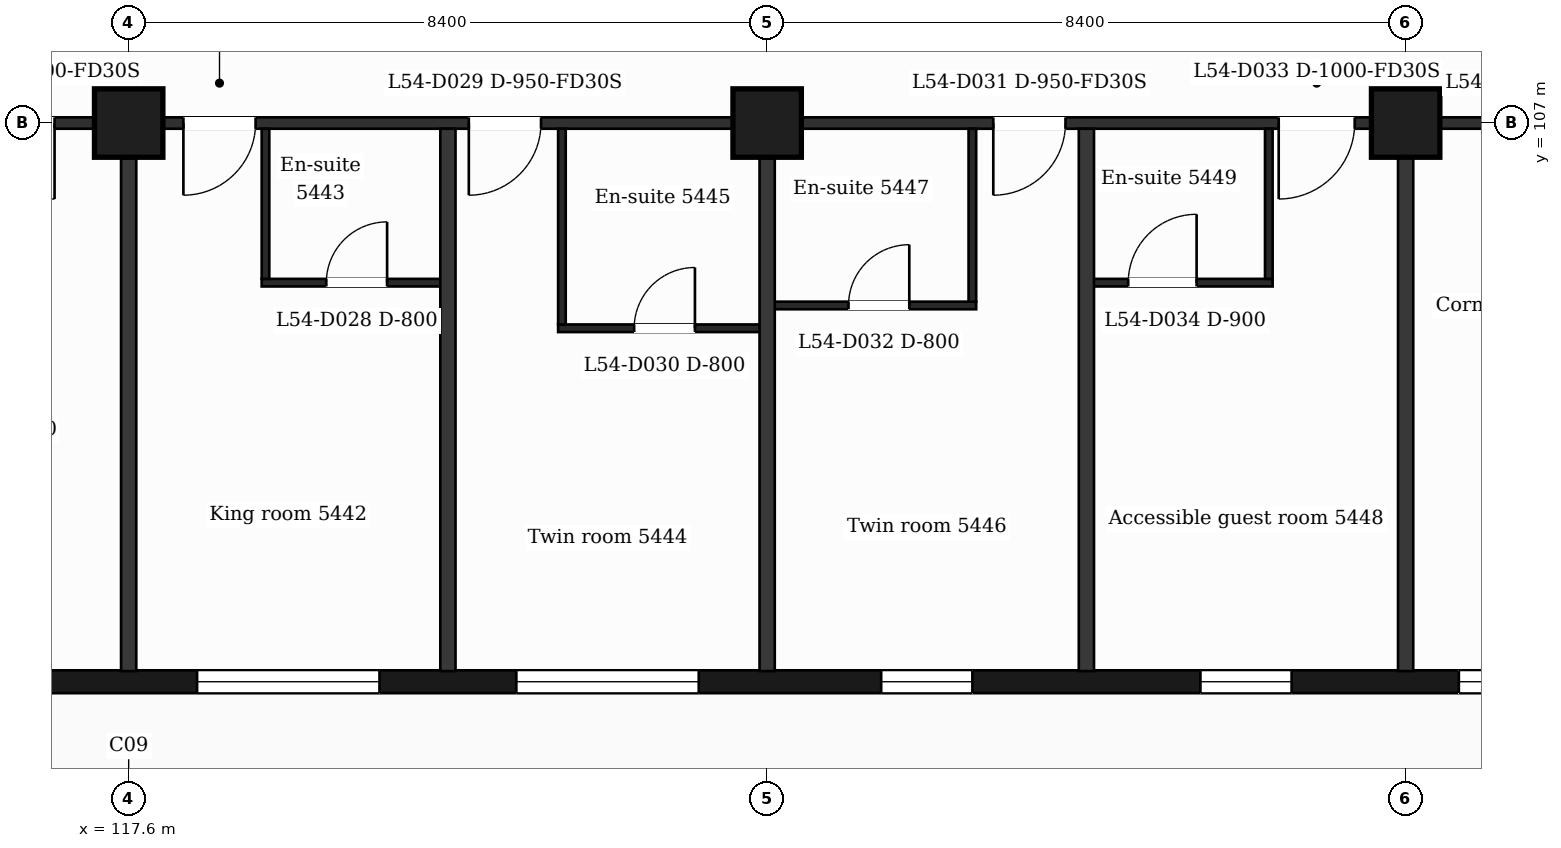
"""IFC4 building model, lengths in metres.
Left out: names, types, materials, properties, quantities, classifications, styles, units other than length and angle.
Written with IfcOpenShell. Run it as: python <this file> out.ifc"""

import sys

from ifc_helpers import new_model, si_unit, direction, frame, frame_2d, origin, origin_2d, place, context, subcontext, project, spatial, rectangle, extrude, element, fill, save


model = new_model("IFC4")
c1 = context("Model", 3, precision=1e-05, world=origin(), true_north=direction((0.0, 1.0)))
c2 = subcontext(c1, "Body", "Model", "MODEL_VIEW")
j1 = project(units=[si_unit("LENGTHUNIT", "METRE"), si_unit("PLANEANGLEUNIT", "RADIAN")], contexts=[c1])
p1 = place(None, origin())
s1 = spatial("IfcSite", under=j1, at=p1, CompositionType="ELEMENT")
p2 = place(p1, origin())
s2 = spatial("IfcBuilding", under=s1, at=p2, CompositionType="ELEMENT")
p3 = place(p2, frame((0.0, 0.0, 224.4)))
s3 = spatial("IfcBuildingStorey", under=s2, at=p3, CompositionType="ELEMENT", Elevation=224.4)
for number, where, z_axis, x_axis in (
    (1, (117.6, 107.0, 0.0), (0.0, 0.0, 1.0), (1.0, 0.0, 0.0)),
    (2, (126.0, 107.0, 0.0), (0.0, 0.0, 1.0), (1.0, 0.0, 0.0)),
    (3, (134.4, 107.0, 0.0), (0.0, 0.0, 1.0), (1.0, 0.0, 0.0)),
):
    element("IfcColumn", number, at=place(p3, frame(where, z_axis=z_axis, x_axis=x_axis)), inside=s3, PredefinedType="COLUMN", context=c2, shape_type="SweptSolid", body=[
        extrude(rectangle(XDim=0.9, YDim=0.9, at=origin_2d()), origin(), (0.0, 0.0, 1.0), 3.7),
    ])
p4 = place(p3, frame((89.85, 99.65, 0.0), z_axis=(0.0, 0.0, 1.0), x_axis=(1.0, 0.0, 0.0)))
e4 = element("IfcWall", 4, at=p4, inside=s3, PredefinedType="SOLIDWALL", context=c2, shape_type="SweptSolid", body=[
    extrude(rectangle(XDim=47.25, YDim=0.3, at=frame_2d((23.625, 0.0))), origin(), (0.0, 0.0, 1.0), 3.38),
])
p5 = place(p4, frame((0.725, 0.0, 0.9)))
e5 = element("IfcOpeningElement", 5, at=p5, cuts=e4, PredefinedType="OPENING", context=c2, shape_type="SweptSolid", body=[
    extrude(rectangle(XDim=1.2, YDim=2.1, at=frame_2d((0.6, 1.05))), frame((0.0, 0.16, 0.0), z_axis=(0.0, -1.0, 0.0), x_axis=(1.0, 0.0, 0.0)), (0.0, 0.0, 1.0), 0.32),
])
p6 = place(p4, frame((3.45, 0.0, 0.9)))
e6 = element("IfcOpeningElement", 6, at=p6, cuts=e4, PredefinedType="OPENING", context=c2, shape_type="SweptSolid", body=[
    extrude(rectangle(XDim=2.4, YDim=2.1, at=frame_2d((1.2, 1.05))), frame((0.0, 0.16, 0.0), z_axis=(0.0, -1.0, 0.0), x_axis=(1.0, 0.0, 0.0)), (0.0, 0.0, 1.0), 0.32),
])
p7 = place(p4, frame((8.25, 0.0, 0.9)))
e7 = element("IfcOpeningElement", 7, at=p7, cuts=e4, PredefinedType="OPENING", context=c2, shape_type="SweptSolid", body=[
    extrude(rectangle(XDim=1.2, YDim=2.1, at=frame_2d((0.6, 1.05))), frame((0.0, 0.16, 0.0), z_axis=(0.0, -1.0, 0.0), x_axis=(1.0, 0.0, 0.0)), (0.0, 0.0, 1.0), 0.32),
])
p8 = place(p4, frame((12.45, 0.0, 0.9)))
e8 = element("IfcOpeningElement", 8, at=p8, cuts=e4, PredefinedType="OPENING", context=c2, shape_type="SweptSolid", body=[
    extrude(rectangle(XDim=1.2, YDim=2.1, at=frame_2d((0.6, 1.05))), frame((0.0, 0.16, 0.0), z_axis=(0.0, -1.0, 0.0), x_axis=(1.0, 0.0, 0.0)), (0.0, 0.0, 1.0), 0.32),
])
p9 = place(p4, frame((16.05, 0.0, 0.9)))
e9 = element("IfcOpeningElement", 9, at=p9, cuts=e4, PredefinedType="OPENING", context=c2, shape_type="SweptSolid", body=[
    extrude(rectangle(XDim=2.4, YDim=2.1, at=frame_2d((1.2, 1.05))), frame((0.0, 0.16, 0.0), z_axis=(0.0, -1.0, 0.0), x_axis=(1.0, 0.0, 0.0)), (0.0, 0.0, 1.0), 0.32),
])
p10 = place(p4, frame((20.25, 0.0, 0.9)))
e10 = element("IfcOpeningElement", 10, at=p10, cuts=e4, PredefinedType="OPENING", context=c2, shape_type="SweptSolid", body=[
    extrude(rectangle(XDim=2.4, YDim=2.1, at=frame_2d((1.2, 1.05))), frame((0.0, 0.16, 0.0), z_axis=(0.0, -1.0, 0.0), x_axis=(1.0, 0.0, 0.0)), (0.0, 0.0, 1.0), 0.32),
])
p11 = place(p4, frame((25.05, 0.0, 0.0)))
e11 = element("IfcOpeningElement", 11, at=p11, cuts=e4, PredefinedType="OPENING", context=c2, shape_type="SweptSolid", body=[
    extrude(rectangle(XDim=1.2, YDim=2.4, at=frame_2d((0.6, 1.2))), frame((0.0, 0.16, 0.0), z_axis=(0.0, -1.0, 0.0), x_axis=(1.0, 0.0, 0.0)), (0.0, 0.0, 1.0), 0.32),
])
p12 = place(p4, frame((28.65, 0.0, 0.9)))
e12 = element("IfcOpeningElement", 12, at=p12, cuts=e4, PredefinedType="OPENING", context=c2, shape_type="SweptSolid", body=[
    extrude(rectangle(XDim=2.4, YDim=2.1, at=frame_2d((1.2, 1.05))), frame((0.0, 0.16, 0.0), z_axis=(0.0, -1.0, 0.0), x_axis=(1.0, 0.0, 0.0)), (0.0, 0.0, 1.0), 0.32),
])
p13 = place(p4, frame((32.85, 0.0, 0.9)))
e13 = element("IfcOpeningElement", 13, at=p13, cuts=e4, PredefinedType="OPENING", context=c2, shape_type="SweptSolid", body=[
    extrude(rectangle(XDim=2.4, YDim=2.1, at=frame_2d((1.2, 1.05))), frame((0.0, 0.16, 0.0), z_axis=(0.0, -1.0, 0.0), x_axis=(1.0, 0.0, 0.0)), (0.0, 0.0, 1.0), 0.32),
])
p14 = place(p4, frame((37.65, 0.0, 0.9)))
e14 = element("IfcOpeningElement", 14, at=p14, cuts=e4, PredefinedType="OPENING", context=c2, shape_type="SweptSolid", body=[
    extrude(rectangle(XDim=1.2, YDim=2.1, at=frame_2d((0.6, 1.05))), frame((0.0, 0.16, 0.0), z_axis=(0.0, -1.0, 0.0), x_axis=(1.0, 0.0, 0.0)), (0.0, 0.0, 1.0), 0.32),
])
p15 = place(p4, frame((41.85, 0.0, 0.9)))
e15 = element("IfcOpeningElement", 15, at=p15, cuts=e4, PredefinedType="OPENING", context=c2, shape_type="SweptSolid", body=[
    extrude(rectangle(XDim=1.2, YDim=2.1, at=frame_2d((0.6, 1.05))), frame((0.0, 0.16, 0.0), z_axis=(0.0, -1.0, 0.0), x_axis=(1.0, 0.0, 0.0)), (0.0, 0.0, 1.0), 0.32),
])
p16 = place(p4, frame((45.25, 0.0, 0.9)))
e16 = element("IfcOpeningElement", 16, at=p16, cuts=e4, PredefinedType="OPENING", context=c2, shape_type="SweptSolid", body=[
    extrude(rectangle(XDim=1.2, YDim=2.1, at=frame_2d((0.6, 1.05))), frame((0.0, 0.16, 0.0), z_axis=(0.0, -1.0, 0.0), x_axis=(1.0, 0.0, 0.0)), (0.0, 0.0, 1.0), 0.32),
])
p17 = place(p3, frame((123.25, 104.3, 0.0), z_axis=(0.0, 0.0, 1.0), x_axis=(1.0, 0.0, 0.0)))
e17 = element("IfcWall", 17, at=p17, inside=s3, PredefinedType="PARTITIONING", context=c2, shape_type="SweptSolid", body=[
    extrude(rectangle(XDim=2.75, YDim=0.1, at=frame_2d((1.375, 0.0))), origin(), (0.0, 0.0, 1.0), 3.38),
])
p18 = place(p17, frame((1.0, 0.0, 0.0)))
e18 = element("IfcOpeningElement", 18, at=p18, cuts=e17, PredefinedType="OPENING", context=c2, shape_type="SweptSolid", body=[
    extrude(rectangle(XDim=0.8, YDim=2.1, at=frame_2d((0.4, 1.05))), frame((0.0, 0.06, 0.0), z_axis=(0.0, -1.0, 0.0), x_axis=(1.0, 0.0, 0.0)), (0.0, 0.0, 1.0), 0.12),
])
p19 = place(p3, frame((126.0, 104.6, 0.0), z_axis=(0.0, 0.0, 1.0), x_axis=(1.0, 0.0, 0.0)))
e19 = element("IfcWall", 19, at=p19, inside=s3, PredefinedType="PARTITIONING", context=c2, shape_type="SweptSolid", body=[
    extrude(rectangle(XDim=2.75, YDim=0.1, at=frame_2d((1.375, 0.0))), origin(), (0.0, 0.0, 1.0), 3.38),
])
p20 = place(p19, frame((1.07, 0.0, 0.0)))
e20 = element("IfcOpeningElement", 20, at=p20, cuts=e19, PredefinedType="OPENING", context=c2, shape_type="SweptSolid", body=[
    extrude(rectangle(XDim=0.8, YDim=2.1, at=frame_2d((0.4, 1.05))), frame((0.0, 0.06, 0.0), z_axis=(0.0, -1.0, 0.0), x_axis=(1.0, 0.0, 0.0)), (0.0, 0.0, 1.0), 0.12),
])
p21 = place(p3, frame((119.35, 104.9, 0.0), z_axis=(0.0, 0.0, 1.0), x_axis=(1.0, 0.0, 0.0)))
e21 = element("IfcWall", 21, at=p21, inside=s3, PredefinedType="PARTITIONING", context=c2, shape_type="SweptSolid", body=[
    extrude(rectangle(XDim=2.45, YDim=0.1, at=frame_2d((1.225, 0.0))), origin(), (0.0, 0.0, 1.0), 3.38),
])
p22 = place(p21, frame((0.85, 0.0, 0.0)))
e22 = element("IfcOpeningElement", 22, at=p22, cuts=e21, PredefinedType="OPENING", context=c2, shape_type="SweptSolid", body=[
    extrude(rectangle(XDim=0.8, YDim=2.1, at=frame_2d((0.4, 1.05))), frame((0.0, 0.06, 0.0), z_axis=(0.0, -1.0, 0.0), x_axis=(1.0, 0.0, 0.0)), (0.0, 0.0, 1.0), 0.12),
])
p23 = place(p3, frame((130.2, 104.9, 0.0), z_axis=(0.0, 0.0, 1.0), x_axis=(1.0, 0.0, 0.0)))
e23 = element("IfcWall", 23, at=p23, inside=s3, PredefinedType="PARTITIONING", context=c2, shape_type="SweptSolid", body=[
    extrude(rectangle(XDim=2.45, YDim=0.1, at=frame_2d((1.225, 0.0))), origin(), (0.0, 0.0, 1.0), 3.38),
])
p24 = place(p23, frame((0.55, 0.0, 0.0)))
e24 = element("IfcOpeningElement", 24, at=p24, cuts=e23, PredefinedType="OPENING", context=c2, shape_type="SweptSolid", body=[
    extrude(rectangle(XDim=0.9, YDim=2.1, at=frame_2d((0.45, 1.05))), frame((0.0, 0.06, 0.0), z_axis=(0.0, -1.0, 0.0), x_axis=(1.0, 0.0, 0.0)), (0.0, 0.0, 1.0), 0.12),
])
p25 = place(p3, frame((87.018, 107.0, 0.0), z_axis=(0.0, 0.0, 1.0), x_axis=(1.0, 0.0, 0.0)))
e25 = element("IfcWall", 25, at=p25, inside=s3, PredefinedType="PARTITIONING", context=c2, shape_type="SweptSolid", body=[
    extrude(rectangle(XDim=52.765, YDim=0.15, at=frame_2d((26.382, 0.0))), origin(), (0.0, 0.0, 1.0), 3.38),
])
p26 = place(p25, frame((0.707, 0.0, 0.0)))
e26 = element("IfcOpeningElement", 26, at=p26, cuts=e25, PredefinedType="OPENING", context=c2, shape_type="SweptSolid", body=[
    extrude(rectangle(XDim=0.95, YDim=2.1, at=frame_2d((0.475, 1.05))), frame((0.0, 0.085, 0.0), z_axis=(0.0, -1.0, 0.0), x_axis=(1.0, 0.0, 0.0)), (0.0, 0.0, 1.0), 0.17),
])
p27 = place(p25, frame((6.894, 0.0, 0.0)))
e27 = element("IfcOpeningElement", 27, at=p27, cuts=e25, PredefinedType="OPENING", context=c2, shape_type="SweptSolid", body=[
    extrude(rectangle(XDim=0.95, YDim=2.1, at=frame_2d((0.475, 1.05))), frame((0.0, 0.085, 0.0), z_axis=(0.0, -1.0, 0.0), x_axis=(1.0, 0.0, 0.0)), (0.0, 0.0, 1.0), 0.17),
])
p28 = place(p25, frame((15.662, 0.0, 0.0)))
e28 = element("IfcOpeningElement", 28, at=p28, cuts=e25, PredefinedType="OPENING", context=c2, shape_type="SweptSolid", body=[
    extrude(rectangle(XDim=0.95, YDim=2.1, at=frame_2d((0.475, 1.05))), frame((0.0, 0.085, 0.0), z_axis=(0.0, -1.0, 0.0), x_axis=(1.0, 0.0, 0.0)), (0.0, 0.0, 1.0), 0.17),
])
p29 = place(p25, frame((18.257, 0.0, 0.0)))
e29 = element("IfcOpeningElement", 29, at=p29, cuts=e25, PredefinedType="OPENING", context=c2, shape_type="SweptSolid", body=[
    extrude(rectangle(XDim=0.95, YDim=2.1, at=frame_2d((0.475, 1.05))), frame((0.0, 0.085, 0.0), z_axis=(0.0, -1.0, 0.0), x_axis=(1.0, 0.0, 0.0)), (0.0, 0.0, 1.0), 0.17),
])
p30 = place(p25, frame((28.607, 0.0, 0.0)))
e30 = element("IfcOpeningElement", 30, at=p30, cuts=e25, PredefinedType="OPENING", context=c2, shape_type="SweptSolid", body=[
    extrude(rectangle(XDim=1.0, YDim=2.1, at=frame_2d((0.5, 1.05))), frame((0.0, 0.085, 0.0), z_axis=(0.0, -1.0, 0.0), x_axis=(1.0, 0.0, 0.0)), (0.0, 0.0, 1.0), 0.17),
])
p31 = place(p25, frame((31.302, 0.0, 0.0)))
e31 = element("IfcOpeningElement", 31, at=p31, cuts=e25, PredefinedType="OPENING", context=c2, shape_type="SweptSolid", body=[
    extrude(rectangle(XDim=0.95, YDim=2.1, at=frame_2d((0.475, 1.05))), frame((0.0, 0.085, 0.0), z_axis=(0.0, -1.0, 0.0), x_axis=(1.0, 0.0, 0.0)), (0.0, 0.0, 1.0), 0.17),
])
p32 = place(p25, frame((35.057, 0.0, 0.0)))
e32 = element("IfcOpeningElement", 32, at=p32, cuts=e25, PredefinedType="OPENING", context=c2, shape_type="SweptSolid", body=[
    extrude(rectangle(XDim=0.95, YDim=2.1, at=frame_2d((0.475, 1.05))), frame((0.0, 0.085, 0.0), z_axis=(0.0, -1.0, 0.0), x_axis=(1.0, 0.0, 0.0)), (0.0, 0.0, 1.0), 0.17),
])
p33 = place(p25, frame((41.957, 0.0, 0.0)))
e33 = element("IfcOpeningElement", 33, at=p33, cuts=e25, PredefinedType="OPENING", context=c2, shape_type="SweptSolid", body=[
    extrude(rectangle(XDim=0.95, YDim=2.1, at=frame_2d((0.475, 1.05))), frame((0.0, 0.085, 0.0), z_axis=(0.0, -1.0, 0.0), x_axis=(1.0, 0.0, 0.0)), (0.0, 0.0, 1.0), 0.17),
])
p34 = place(p25, frame((45.712, 0.0, 0.0)))
e34 = element("IfcOpeningElement", 34, at=p34, cuts=e25, PredefinedType="OPENING", context=c2, shape_type="SweptSolid", body=[
    extrude(rectangle(XDim=1.0, YDim=2.1, at=frame_2d((0.5, 1.05))), frame((0.0, 0.085, 0.0), z_axis=(0.0, -1.0, 0.0), x_axis=(1.0, 0.0, 0.0)), (0.0, 0.0, 1.0), 0.17),
])
p35 = place(p25, frame((48.974, 0.0, 0.0)))
e35 = element("IfcOpeningElement", 35, at=p35, cuts=e25, PredefinedType="OPENING", context=c2, shape_type="SweptSolid", body=[
    extrude(rectangle(XDim=0.95, YDim=2.1, at=frame_2d((0.475, 1.05))), frame((0.0, 0.085, 0.0), z_axis=(0.0, -1.0, 0.0), x_axis=(1.0, 0.0, 0.0)), (0.0, 0.0, 1.0), 0.17),
])
p36 = place(p3, frame((117.6, 99.79, 0.0), z_axis=(0.0, 0.0, 1.0), x_axis=(0.0, 1.0, 0.0)))
e36 = element("IfcWall", 36, at=p36, inside=s3, PredefinedType="PARTITIONING", context=c2, shape_type="SweptSolid", body=[
    extrude(rectangle(XDim=7.135, YDim=0.2, at=frame_2d((3.567, 0.0))), origin(), (0.0, 0.0, 1.0), 3.38),
])
p37 = place(p3, frame((119.4, 104.95, 0.0), z_axis=(0.0, 0.0, 1.0), x_axis=(0.0, 1.0, 0.0)))
e37 = element("IfcWall", 37, at=p37, inside=s3, PredefinedType="PARTITIONING", context=c2, shape_type="SweptSolid", body=[
    extrude(rectangle(XDim=1.975, YDim=0.1, at=frame_2d((0.988, 0.0))), origin(), (0.0, 0.0, 1.0), 3.38),
])
p38 = place(p3, frame((121.8, 99.79, 0.0), z_axis=(0.0, 0.0, 1.0), x_axis=(0.0, 1.0, 0.0)))
e38 = element("IfcWall", 38, at=p38, inside=s3, PredefinedType="PARTITIONING", context=c2, shape_type="SweptSolid", body=[
    extrude(rectangle(XDim=7.135, YDim=0.2, at=frame_2d((3.567, 0.0))), origin(), (0.0, 0.0, 1.0), 3.38),
])
p39 = place(p3, frame((123.3, 104.35, 0.0), z_axis=(0.0, 0.0, 1.0), x_axis=(0.0, 1.0, 0.0)))
e39 = element("IfcWall", 39, at=p39, inside=s3, PredefinedType="PARTITIONING", context=c2, shape_type="SweptSolid", body=[
    extrude(rectangle(XDim=2.575, YDim=0.1, at=frame_2d((1.288, 0.0))), origin(), (0.0, 0.0, 1.0), 3.38),
])
p40 = place(p3, frame((126.0, 99.79, 0.0), z_axis=(0.0, 0.0, 1.0), x_axis=(0.0, 1.0, 0.0)))
e40 = element("IfcWall", 40, at=p40, inside=s3, PredefinedType="PARTITIONING", context=c2, shape_type="SweptSolid", body=[
    extrude(rectangle(XDim=7.135, YDim=0.2, at=frame_2d((3.567, 0.0))), origin(), (0.0, 0.0, 1.0), 3.38),
])
p41 = place(p3, frame((128.7, 104.65, 0.0), z_axis=(0.0, 0.0, 1.0), x_axis=(0.0, 1.0, 0.0)))
e41 = element("IfcWall", 41, at=p41, inside=s3, PredefinedType="PARTITIONING", context=c2, shape_type="SweptSolid", body=[
    extrude(rectangle(XDim=2.275, YDim=0.1, at=frame_2d((1.138, 0.0))), origin(), (0.0, 0.0, 1.0), 3.38),
])
p42 = place(p3, frame((130.2, 99.79, 0.0), z_axis=(0.0, 0.0, 1.0), x_axis=(0.0, 1.0, 0.0)))
e42 = element("IfcWall", 42, at=p42, inside=s3, PredefinedType="PARTITIONING", context=c2, shape_type="SweptSolid", body=[
    extrude(rectangle(XDim=7.135, YDim=0.2, at=frame_2d((3.567, 0.0))), origin(), (0.0, 0.0, 1.0), 3.38),
])
p43 = place(p3, frame((132.6, 104.95, 0.0), z_axis=(0.0, 0.0, 1.0), x_axis=(0.0, 1.0, 0.0)))
e43 = element("IfcWall", 43, at=p43, inside=s3, PredefinedType="PARTITIONING", context=c2, shape_type="SweptSolid", body=[
    extrude(rectangle(XDim=1.975, YDim=0.1, at=frame_2d((0.988, 0.0))), origin(), (0.0, 0.0, 1.0), 3.38),
])
p44 = place(p3, frame((134.4, 99.79, 0.0), z_axis=(0.0, 0.0, 1.0), x_axis=(0.0, 1.0, 0.0)))
e44 = element("IfcWall", 44, at=p44, inside=s3, PredefinedType="PARTITIONING", context=c2, shape_type="SweptSolid", body=[
    extrude(rectangle(XDim=7.135, YDim=0.2, at=frame_2d((3.567, 0.0))), origin(), (0.0, 0.0, 1.0), 3.38),
])
p45 = place(p12, origin())
e45 = element("IfcWindow", 45, at=p45, inside=s3, PartitioningType="SINGLE_PANEL", PredefinedType="WINDOW", context=c2, shape_type="SweptSolid", body=[
    extrude(rectangle(XDim=2.4, YDim=2.1, at=frame_2d((1.2, 1.05))), frame((0.0, 0.03, 0.0), z_axis=(0.0, -1.0, 0.0), x_axis=(1.0, 0.0, 0.0)), (0.0, 0.0, 1.0), 0.06),
])
fill(e12, e45)
p46 = place(p13, origin())
e46 = element("IfcWindow", 46, at=p46, inside=s3, PartitioningType="SINGLE_PANEL", PredefinedType="WINDOW", context=c2, shape_type="SweptSolid", body=[
    extrude(rectangle(XDim=2.4, YDim=2.1, at=frame_2d((1.2, 1.05))), frame((0.0, 0.03, 0.0), z_axis=(0.0, -1.0, 0.0), x_axis=(1.0, 0.0, 0.0)), (0.0, 0.0, 1.0), 0.06),
])
fill(e13, e46)
p47 = place(p14, origin())
e47 = element("IfcWindow", 47, at=p47, inside=s3, PartitioningType="SINGLE_PANEL", PredefinedType="WINDOW", context=c2, shape_type="SweptSolid", body=[
    extrude(rectangle(XDim=1.2, YDim=2.1, at=frame_2d((0.6, 1.05))), frame((0.0, 0.03, 0.0), z_axis=(0.0, -1.0, 0.0), x_axis=(1.0, 0.0, 0.0)), (0.0, 0.0, 1.0), 0.06),
])
fill(e14, e47)
p48 = place(p15, origin())
e48 = element("IfcWindow", 48, at=p48, inside=s3, PartitioningType="SINGLE_PANEL", PredefinedType="WINDOW", context=c2, shape_type="SweptSolid", body=[
    extrude(rectangle(XDim=1.2, YDim=2.1, at=frame_2d((0.6, 1.05))), frame((0.0, 0.03, 0.0), z_axis=(0.0, -1.0, 0.0), x_axis=(1.0, 0.0, 0.0)), (0.0, 0.0, 1.0), 0.06),
])
fill(e15, e48)
p49 = place(p16, origin())
e49 = element("IfcWindow", 49, at=p49, inside=s3, PartitioningType="SINGLE_PANEL", PredefinedType="WINDOW", context=c2, shape_type="SweptSolid", body=[
    extrude(rectangle(XDim=1.2, YDim=2.1, at=frame_2d((0.6, 1.05))), frame((0.0, 0.03, 0.0), z_axis=(0.0, -1.0, 0.0), x_axis=(1.0, 0.0, 0.0)), (0.0, 0.0, 1.0), 0.06),
])
fill(e16, e49)
p50 = place(p30, origin())
e50 = element("IfcDoor", 50, at=p50, inside=s3, OperationType="SINGLE_SWING_RIGHT", PredefinedType="DOOR", context=c2, shape_type="SweptSolid", body=[
    extrude(rectangle(XDim=1.0, YDim=2.1, at=frame_2d((0.5, 1.05))), frame((0.0, 0.025, 0.0), z_axis=(0.0, -1.0, 0.0), x_axis=(1.0, 0.0, 0.0)), (0.0, 0.0, 1.0), 0.05),
])
fill(e30, e50)
p51 = place(p31, origin())
e51 = element("IfcDoor", 51, at=p51, inside=s3, OperationType="SINGLE_SWING_LEFT", PredefinedType="DOOR", context=c2, shape_type="SweptSolid", body=[
    extrude(rectangle(XDim=0.95, YDim=2.1, at=frame_2d((0.475, 1.05))), frame((0.0, 0.025, 0.0), z_axis=(0.0, -1.0, 0.0), x_axis=(1.0, 0.0, 0.0)), (0.0, 0.0, 1.0), 0.05),
])
fill(e31, e51)
p52 = place(p22, origin())
e52 = element("IfcDoor", 52, at=p52, inside=s3, OperationType="SINGLE_SWING_RIGHT", PredefinedType="DOOR", context=c2, shape_type="SweptSolid", body=[
    extrude(rectangle(XDim=0.8, YDim=2.1, at=frame_2d((0.4, 1.05))), frame((0.0, 0.025, 0.0), z_axis=(0.0, -1.0, 0.0), x_axis=(1.0, 0.0, 0.0)), (0.0, 0.0, 1.0), 0.05),
])
fill(e22, e52)
p53 = place(p32, origin())
e53 = element("IfcDoor", 53, at=p53, inside=s3, OperationType="SINGLE_SWING_LEFT", PredefinedType="DOOR", context=c2, shape_type="SweptSolid", body=[
    extrude(rectangle(XDim=0.95, YDim=2.1, at=frame_2d((0.475, 1.05))), frame((0.0, 0.025, 0.0), z_axis=(0.0, -1.0, 0.0), x_axis=(1.0, 0.0, 0.0)), (0.0, 0.0, 1.0), 0.05),
])
fill(e32, e53)
p54 = place(p18, origin())
e54 = element("IfcDoor", 54, at=p54, inside=s3, OperationType="SINGLE_SWING_RIGHT", PredefinedType="DOOR", context=c2, shape_type="SweptSolid", body=[
    extrude(rectangle(XDim=0.8, YDim=2.1, at=frame_2d((0.4, 1.05))), frame((0.0, 0.025, 0.0), z_axis=(0.0, -1.0, 0.0), x_axis=(1.0, 0.0, 0.0)), (0.0, 0.0, 1.0), 0.05),
])
fill(e18, e54)
p55 = place(p33, origin())
e55 = element("IfcDoor", 55, at=p55, inside=s3, OperationType="SINGLE_SWING_LEFT", PredefinedType="DOOR", context=c2, shape_type="SweptSolid", body=[
    extrude(rectangle(XDim=0.95, YDim=2.1, at=frame_2d((0.475, 1.05))), frame((0.0, 0.025, 0.0), z_axis=(0.0, -1.0, 0.0), x_axis=(1.0, 0.0, 0.0)), (0.0, 0.0, 1.0), 0.05),
])
fill(e33, e55)
p56 = place(p20, origin())
e56 = element("IfcDoor", 56, at=p56, inside=s3, OperationType="SINGLE_SWING_RIGHT", PredefinedType="DOOR", context=c2, shape_type="SweptSolid", body=[
    extrude(rectangle(XDim=0.8, YDim=2.1, at=frame_2d((0.4, 1.05))), frame((0.0, 0.025, 0.0), z_axis=(0.0, -1.0, 0.0), x_axis=(1.0, 0.0, 0.0)), (0.0, 0.0, 1.0), 0.05),
])
fill(e20, e56)
p57 = place(p34, origin())
e57 = element("IfcDoor", 57, at=p57, inside=s3, OperationType="SINGLE_SWING_LEFT", PredefinedType="DOOR", context=c2, shape_type="SweptSolid", body=[
    extrude(rectangle(XDim=1.0, YDim=2.1, at=frame_2d((0.5, 1.05))), frame((0.0, 0.025, 0.0), z_axis=(0.0, -1.0, 0.0), x_axis=(1.0, 0.0, 0.0)), (0.0, 0.0, 1.0), 0.05),
])
fill(e34, e57)
p58 = place(p24, origin())
e58 = element("IfcDoor", 58, at=p58, inside=s3, OperationType="SINGLE_SWING_RIGHT", PredefinedType="DOOR", context=c2, shape_type="SweptSolid", body=[
    extrude(rectangle(XDim=0.9, YDim=2.1, at=frame_2d((0.45, 1.05))), frame((0.0, 0.025, 0.0), z_axis=(0.0, -1.0, 0.0), x_axis=(1.0, 0.0, 0.0)), (0.0, 0.0, 1.0), 0.05),
])
fill(e24, e58)
save(model, sys.argv[1])
